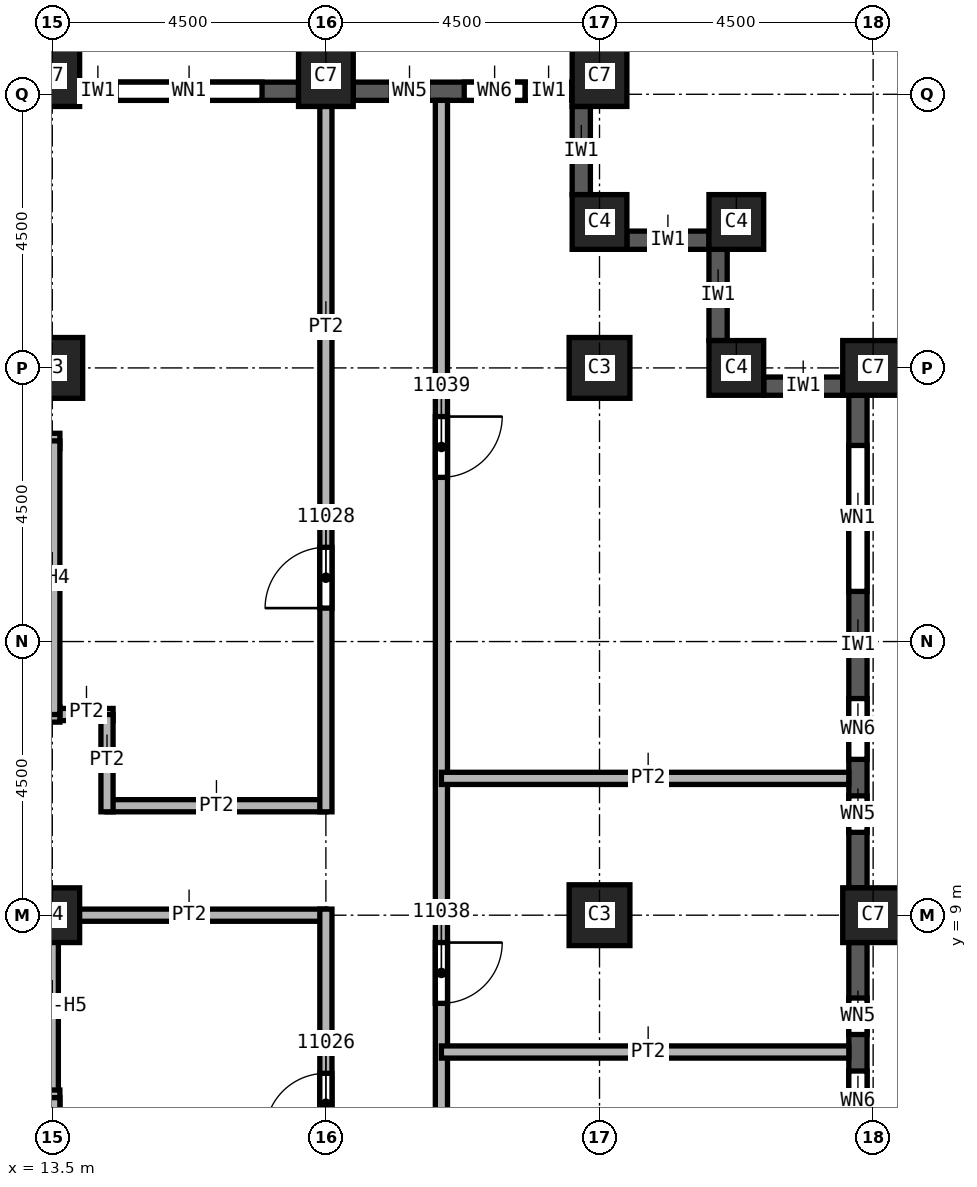
"""IFC4 building model, lengths in metres.
Left out: names, types, materials, properties, quantities, classifications, styles, units other than length and angle.
Written with IfcOpenShell. Run it as: python <this file> out.ifc"""

import sys

from ifc_helpers import new_model, si_unit, direction, frame, frame_2d, origin, origin_2d, place, context, subcontext, project, spatial, rectangle, extrude, element, fill, save


model = new_model("IFC4")
c1 = context("Model", 3, precision=1e-05, world=origin(), true_north=direction((0.0, 1.0)))
c2 = subcontext(c1, "Body", "Model", "MODEL_VIEW")
j1 = project(units=[si_unit("LENGTHUNIT", "METRE"), si_unit("PLANEANGLEUNIT", "RADIAN")], contexts=[c1])
p1 = place(None, origin())
s1 = spatial("IfcSite", under=j1, at=p1, CompositionType="ELEMENT")
p2 = place(p1, origin())
s2 = spatial("IfcBuilding", under=s1, at=p2, CompositionType="ELEMENT")
p3 = place(p2, frame((0.0, 0.0, 188.0)))
s3 = spatial("IfcBuildingStorey", under=s2, at=p3, CompositionType="ELEMENT", Elevation=188.0)
for number, where, z_axis, x_axis in (
    (1, (13.5, 18.0, 0.0), (0.0, 0.0, 1.0), (1.0, 0.0, 0.0)),
    (2, (22.5, 9.0, 0.0), (0.0, 0.0, 1.0), (1.0, 0.0, 0.0)),
    (3, (22.5, 18.0, 0.0), (0.0, 0.0, 1.0), (1.0, 0.0, 0.0)),
):
    element("IfcColumn", number, at=place(p3, frame(where, z_axis=z_axis, x_axis=x_axis)), inside=s3, PredefinedType="COLUMN", context=c2, shape_type="SweptSolid", body=[
        extrude(rectangle(XDim=1.0, YDim=1.0, at=origin_2d()), origin(), (0.0, 0.0, 1.0), 3.72),
    ])
p4 = place(p3, frame((13.5, 9.0, 0.0), z_axis=(0.0, 0.0, 1.0), x_axis=(1.0, 0.0, 0.0)))
e4 = element("IfcColumn", 4, at=p4, inside=s3, PredefinedType="COLUMN", context=c2, shape_type="SweptSolid", body=[
    extrude(rectangle(XDim=0.9, YDim=0.9, at=origin_2d()), origin(), (0.0, 0.0, 1.0), 3.72),
])
for number, where, z_axis, x_axis in (
    (5, (27.0, 9.0, 0.0), (0.0, 0.0, 1.0), (0.0, 1.0, 0.0)),
    (6, (27.0, 18.0, 0.0), (0.0, 0.0, 1.0), (0.0, 1.0, 0.0)),
    (7, (13.5, 22.8, 0.0), (0.0, 0.0, 1.0), (1.0, 0.0, 0.0)),
    (8, (18.0, 22.8, 0.0), (0.0, 0.0, 1.0), (1.0, 0.0, 0.0)),
    (9, (22.5, 22.8, 0.0), (0.0, 0.0, 1.0), (1.0, 0.0, 0.0)),
):
    element("IfcColumn", number, at=place(p3, frame(where, z_axis=z_axis, x_axis=x_axis)), inside=s3, PredefinedType="COLUMN", context=c2, shape_type="SweptSolid", body=[
        extrude(rectangle(XDim=0.9, YDim=1.0, at=origin_2d()), origin(), (0.0, 0.0, 1.0), 3.72),
    ])
for number, where, z_axis, x_axis in (
    (10, (22.5, 20.4, 0.0), (0.0, 0.0, 1.0), (1.0, 0.0, 0.0)),
    (11, (24.75, 20.4, 0.0), (0.0, 0.0, 1.0), (1.0, 0.0, 0.0)),
    (12, (24.75, 18.0, 0.0), (0.0, 0.0, 1.0), (1.0, 0.0, 0.0)),
):
    element("IfcColumn", number, at=place(p3, frame(where, z_axis=z_axis, x_axis=x_axis)), inside=s3, PredefinedType="COLUMN", context=c2, shape_type="SweptSolid", body=[
        extrude(rectangle(XDim=0.9, YDim=0.9, at=origin_2d()), origin(), (0.0, 0.0, 1.0), 3.72),
    ])
p5 = place(p3, frame((26.75, 0.45, 0.0), z_axis=(0.0, 0.0, 1.0), x_axis=(0.0, 1.0, 0.0)))
e13 = element("IfcWall", 13, at=p5, inside=s3, PredefinedType="SOLIDWALL", context=c2, shape_type="SweptSolid", body=[
    extrude(rectangle(XDim=8.1, YDim=0.3, at=frame_2d((4.05, 0.0))), origin(), (0.0, 0.0, 1.0), 3.12),
])
p6 = place(p5, frame((0.825, 0.0, 0.8)))
e14 = element("IfcOpeningElement", 14, at=p6, cuts=e13, PredefinedType="OPENING", context=c2, shape_type="SweptSolid", body=[
    extrude(rectangle(XDim=2.4, YDim=1.95, at=frame_2d((1.2, 0.975))), frame((0.0, 0.15, 0.0), z_axis=(0.0, -1.0, 0.0), x_axis=(1.0, 0.0, 0.0)), (0.0, 0.0, 1.0), 0.3),
])
p7 = place(p5, frame((4.988, 0.0, 0.8)))
e15 = element("IfcOpeningElement", 15, at=p7, cuts=e13, PredefinedType="OPENING", context=c2, shape_type="SweptSolid", body=[
    extrude(rectangle(XDim=1.0, YDim=1.95, at=frame_2d((0.5, 0.975))), frame((0.0, 0.15, 0.0), z_axis=(0.0, -1.0, 0.0), x_axis=(1.0, 0.0, 0.0)), (0.0, 0.0, 1.0), 0.3),
])
p8 = place(p5, frame((6.587, 0.0, 0.8)))
e16 = element("IfcOpeningElement", 16, at=p8, cuts=e13, PredefinedType="OPENING", context=c2, shape_type="SweptSolid", body=[
    extrude(rectangle(XDim=0.6, YDim=1.95, at=frame_2d((0.3, 0.975))), frame((0.0, 0.15, 0.0), z_axis=(0.0, -1.0, 0.0), x_axis=(1.0, 0.0, 0.0)), (0.0, 0.0, 1.0), 0.3),
])
p9 = place(p3, frame((26.75, 9.45, 0.0), z_axis=(0.0, 0.0, 1.0), x_axis=(0.0, 1.0, 0.0)))
e17 = element("IfcWall", 17, at=p9, inside=s3, PredefinedType="SOLIDWALL", context=c2, shape_type="SweptSolid", body=[
    extrude(rectangle(XDim=8.1, YDim=0.3, at=frame_2d((4.05, 0.0))), origin(), (0.0, 0.0, 1.0), 3.12),
])
p10 = place(p9, frame((4.875, 0.0, 0.8)))
e18 = element("IfcOpeningElement", 18, at=p10, cuts=e17, PredefinedType="OPENING", context=c2, shape_type="SweptSolid", body=[
    extrude(rectangle(XDim=2.4, YDim=1.95, at=frame_2d((1.2, 0.975))), frame((0.0, 0.15, 0.0), z_axis=(0.0, -1.0, 0.0), x_axis=(1.0, 0.0, 0.0)), (0.0, 0.0, 1.0), 0.3),
])
p11 = place(p9, frame((0.913, 0.0, 0.8)))
e19 = element("IfcOpeningElement", 19, at=p11, cuts=e17, PredefinedType="OPENING", context=c2, shape_type="SweptSolid", body=[
    extrude(rectangle(XDim=0.6, YDim=1.95, at=frame_2d((0.3, 0.975))), frame((0.0, 0.15, 0.0), z_axis=(0.0, -1.0, 0.0), x_axis=(1.0, 0.0, 0.0)), (0.0, 0.0, 1.0), 0.3),
])
p12 = place(p9, frame((2.113, 0.0, 0.8)))
e20 = element("IfcOpeningElement", 20, at=p12, cuts=e17, PredefinedType="OPENING", context=c2, shape_type="SweptSolid", body=[
    extrude(rectangle(XDim=1.0, YDim=1.95, at=frame_2d((0.5, 0.975))), frame((0.0, 0.15, 0.0), z_axis=(0.0, -1.0, 0.0), x_axis=(1.0, 0.0, 0.0)), (0.0, 0.0, 1.0), 0.3),
])
p13 = place(p3, frame((26.5, 17.7, 0.0), z_axis=(0.0, 0.0, 1.0), x_axis=(-1.0, 0.0, 0.0)))
e21 = element("IfcWall", 21, at=p13, inside=s3, PredefinedType="SOLIDWALL", context=c2, shape_type="SweptSolid", body=[
    extrude(rectangle(XDim=1.3, YDim=0.3, at=frame_2d((0.65, 0.0))), origin(), (0.0, 0.0, 1.0), 3.12),
])
p14 = place(p3, frame((24.45, 18.45, 0.0), z_axis=(0.0, 0.0, 1.0), x_axis=(0.0, 1.0, 0.0)))
e22 = element("IfcWall", 22, at=p14, inside=s3, PredefinedType="SOLIDWALL", context=c2, shape_type="SweptSolid", body=[
    extrude(rectangle(XDim=1.5, YDim=0.3, at=frame_2d((0.75, 0.0))), origin(), (0.0, 0.0, 1.0), 3.12),
])
p15 = place(p3, frame((24.3, 20.1, 0.0), z_axis=(0.0, 0.0, 1.0), x_axis=(-1.0, 0.0, 0.0)))
e23 = element("IfcWall", 23, at=p15, inside=s3, PredefinedType="SOLIDWALL", context=c2, shape_type="SweptSolid", body=[
    extrude(rectangle(XDim=1.35, YDim=0.3, at=frame_2d((0.675, 0.0))), origin(), (0.0, 0.0, 1.0), 3.12),
])
p16 = place(p3, frame((22.2, 20.85, 0.0), z_axis=(0.0, 0.0, 1.0), x_axis=(0.0, 1.0, 0.0)))
e24 = element("IfcWall", 24, at=p16, inside=s3, PredefinedType="SOLIDWALL", context=c2, shape_type="SweptSolid", body=[
    extrude(rectangle(XDim=1.45, YDim=0.3, at=frame_2d((0.725, 0.0))), origin(), (0.0, 0.0, 1.0), 3.12),
])
p17 = place(p3, frame((22.05, 22.55, 0.0), z_axis=(0.0, 0.0, 1.0), x_axis=(-1.0, 0.0, 0.0)))
e25 = element("IfcWall", 25, at=p17, inside=s3, PredefinedType="SOLIDWALL", context=c2, shape_type="SweptSolid", body=[
    extrude(rectangle(XDim=3.6, YDim=0.3, at=frame_2d((1.8, 0.0))), origin(), (0.0, 0.0, 1.0), 3.12),
])
p18 = place(p17, frame((0.775, 0.0, 0.8)))
e26 = element("IfcOpeningElement", 26, at=p18, cuts=e25, PredefinedType="OPENING", context=c2, shape_type="SweptSolid", body=[
    extrude(rectangle(XDim=1.0, YDim=1.95, at=frame_2d((0.5, 0.975))), frame((0.0, 0.15, 0.0), z_axis=(0.0, -1.0, 0.0), x_axis=(1.0, 0.0, 0.0)), (0.0, 0.0, 1.0), 0.3),
])
p19 = place(p17, frame((2.375, 0.0, 0.8)))
e27 = element("IfcOpeningElement", 27, at=p19, cuts=e25, PredefinedType="OPENING", context=c2, shape_type="SweptSolid", body=[
    extrude(rectangle(XDim=0.6, YDim=1.95, at=frame_2d((0.3, 0.975))), frame((0.0, 0.15, 0.0), z_axis=(0.0, -1.0, 0.0), x_axis=(1.0, 0.0, 0.0)), (0.0, 0.0, 1.0), 0.3),
])
p20 = place(p3, frame((17.55, 22.55, 0.0), z_axis=(0.0, 0.0, 1.0), x_axis=(-1.0, 0.0, 0.0)))
e28 = element("IfcWall", 28, at=p20, inside=s3, PredefinedType="SOLIDWALL", context=c2, shape_type="SweptSolid", body=[
    extrude(rectangle(XDim=3.6, YDim=0.3, at=frame_2d((1.8, 0.0))), origin(), (0.0, 0.0, 1.0), 3.12),
])
p21 = place(p20, frame((0.6, 0.0, 0.8)))
e29 = element("IfcOpeningElement", 29, at=p21, cuts=e28, PredefinedType="OPENING", context=c2, shape_type="SweptSolid", body=[
    extrude(rectangle(XDim=2.4, YDim=1.95, at=frame_2d((1.2, 0.975))), frame((0.0, 0.15, 0.0), z_axis=(0.0, -1.0, 0.0), x_axis=(1.0, 0.0, 0.0)), (0.0, 0.0, 1.0), 0.3),
])
p22 = place(p3, frame((13.375, 12.3, 0.0), z_axis=(0.0, 0.0, 1.0), x_axis=(1.0, 0.0, 0.0)))
e30 = element("IfcWall", 30, at=p22, inside=s3, PredefinedType="PARTITIONING", context=c2, shape_type="SweptSolid", body=[
    extrude(rectangle(XDim=1.125, YDim=0.2, at=frame_2d((0.562, 0.0))), origin(), (0.0, 0.0, 1.0), 3.72),
])
p23 = place(p3, frame((18.0, 9.0, 0.0), z_axis=(0.0, 0.0, 1.0), x_axis=(-1.0, 0.0, 0.0)))
e31 = element("IfcWall", 31, at=p23, inside=s3, PredefinedType="PARTITIONING", context=c2, shape_type="SweptSolid", body=[
    extrude(rectangle(XDim=4.5, YDim=0.2, at=frame_2d((2.25, 0.0))), origin(), (0.0, 0.0, 1.0), 3.72),
])
p24 = place(p3, frame((14.4, 10.8, 0.0), z_axis=(0.0, 0.0, 1.0), x_axis=(1.0, 0.0, 0.0)))
e32 = element("IfcWall", 32, at=p24, inside=s3, PredefinedType="PARTITIONING", context=c2, shape_type="SweptSolid", body=[
    extrude(rectangle(XDim=3.6, YDim=0.2, at=frame_2d((1.8, 0.0))), origin(), (0.0, 0.0, 1.0), 3.72),
])
p25 = place(p3, frame((14.4, 12.3, 0.0), z_axis=(0.0, 0.0, 1.0), x_axis=(0.0, -1.0, 0.0)))
e33 = element("IfcWall", 33, at=p25, inside=s3, PredefinedType="PARTITIONING", context=c2, shape_type="SweptSolid", body=[
    extrude(rectangle(XDim=1.6, YDim=0.2, at=frame_2d((0.8, 0.0))), origin(), (0.0, 0.0, 1.0), 3.72),
])
p26 = place(p3, frame((18.0, -9.1, 0.0), z_axis=(0.0, 0.0, 1.0), x_axis=(0.0, 1.0, 0.0)))
e34 = element("IfcWall", 34, at=p26, inside=s3, PredefinedType="PARTITIONING", context=c2, shape_type="SweptSolid", body=[
    extrude(rectangle(XDim=18.2, YDim=0.2, at=frame_2d((9.1, 0.0))), origin(), (0.0, 0.0, 1.0), 3.72),
])
p27 = place(p26, frame((2.8, 0.0, 0.0)))
e35 = element("IfcOpeningElement", 35, at=p27, cuts=e34, PredefinedType="OPENING", context=c2, shape_type="SweptSolid", body=[
    extrude(rectangle(XDim=1.0, YDim=2.1, at=frame_2d((0.5, 1.05))), frame((0.0, 0.1, 0.0), z_axis=(0.0, -1.0, 0.0), x_axis=(1.0, 0.0, 0.0)), (0.0, 0.0, 1.0), 0.2),
])
p28 = place(p26, frame((8.65, 0.0, 0.0)))
e36 = element("IfcOpeningElement", 36, at=p28, cuts=e34, PredefinedType="OPENING", context=c2, shape_type="SweptSolid", body=[
    extrude(rectangle(XDim=1.0, YDim=2.1, at=frame_2d((0.5, 1.05))), frame((0.0, 0.1, 0.0), z_axis=(0.0, -1.0, 0.0), x_axis=(1.0, 0.0, 0.0)), (0.0, 0.0, 1.0), 0.2),
])
p29 = place(p26, frame((14.5, 0.0, 0.0)))
e37 = element("IfcOpeningElement", 37, at=p29, cuts=e34, PredefinedType="OPENING", context=c2, shape_type="SweptSolid", body=[
    extrude(rectangle(XDim=1.0, YDim=2.1, at=frame_2d((0.5, 1.05))), frame((0.0, 0.1, 0.0), z_axis=(0.0, -1.0, 0.0), x_axis=(1.0, 0.0, 0.0)), (0.0, 0.0, 1.0), 0.2),
])
p30 = place(p3, frame((18.0, 10.7, 0.0), z_axis=(0.0, 0.0, 1.0), x_axis=(0.0, 1.0, 0.0)))
e38 = element("IfcWall", 38, at=p30, inside=s3, PredefinedType="PARTITIONING", context=c2, shape_type="SweptSolid", body=[
    extrude(rectangle(XDim=11.6, YDim=0.2, at=frame_2d((5.8, 0.0))), origin(), (0.0, 0.0, 1.0), 3.72),
])
p31 = place(p30, frame((3.35, 0.0, 0.0)))
e39 = element("IfcOpeningElement", 39, at=p31, cuts=e38, PredefinedType="OPENING", context=c2, shape_type="SweptSolid", body=[
    extrude(rectangle(XDim=1.0, YDim=2.1, at=frame_2d((0.5, 1.05))), frame((0.0, 0.1, 0.0), z_axis=(0.0, -1.0, 0.0), x_axis=(1.0, 0.0, 0.0)), (0.0, 0.0, 1.0), 0.2),
])
p32 = place(p3, frame((19.9, 22.4, 0.0), z_axis=(0.0, 0.0, 1.0), x_axis=(0.0, -1.0, 0.0)))
e40 = element("IfcWall", 40, at=p32, inside=s3, PredefinedType="PARTITIONING", context=c2, shape_type="SweptSolid", body=[
    extrude(rectangle(XDim=44.8, YDim=0.2, at=frame_2d((22.4, 0.0))), origin(), (0.0, 0.0, 1.0), 3.72),
])
p33 = place(p32, frame((20.3, 0.0, 0.0)))
e41 = element("IfcOpeningElement", 41, at=p33, cuts=e40, PredefinedType="OPENING", context=c2, shape_type="SweptSolid", body=[
    extrude(rectangle(XDim=1.0, YDim=2.1, at=frame_2d((0.5, 1.05))), frame((0.0, 0.1, 0.0), z_axis=(0.0, -1.0, 0.0), x_axis=(1.0, 0.0, 0.0)), (0.0, 0.0, 1.0), 0.2),
])
p34 = place(p32, frame((13.85, 0.0, 0.0)))
e42 = element("IfcOpeningElement", 42, at=p34, cuts=e40, PredefinedType="OPENING", context=c2, shape_type="SweptSolid", body=[
    extrude(rectangle(XDim=1.0, YDim=2.1, at=frame_2d((0.5, 1.05))), frame((0.0, 0.1, 0.0), z_axis=(0.0, -1.0, 0.0), x_axis=(1.0, 0.0, 0.0)), (0.0, 0.0, 1.0), 0.2),
])
p35 = place(p32, frame((5.2, 0.0, 0.0)))
e43 = element("IfcOpeningElement", 43, at=p35, cuts=e40, PredefinedType="OPENING", context=c2, shape_type="SweptSolid", body=[
    extrude(rectangle(XDim=1.0, YDim=2.1, at=frame_2d((0.5, 1.05))), frame((0.0, 0.1, 0.0), z_axis=(0.0, -1.0, 0.0), x_axis=(1.0, 0.0, 0.0)), (0.0, 0.0, 1.0), 0.2),
])
p36 = place(p32, frame((40.05, 0.0, 0.0)))
e44 = element("IfcOpeningElement", 44, at=p36, cuts=e40, PredefinedType="OPENING", context=c2, shape_type="SweptSolid", body=[
    extrude(rectangle(XDim=1.0, YDim=2.1, at=frame_2d((0.5, 1.05))), frame((0.0, 0.1, 0.0), z_axis=(0.0, -1.0, 0.0), x_axis=(1.0, 0.0, 0.0)), (0.0, 0.0, 1.0), 0.2),
])
p37 = place(p32, frame((26.9, 0.0, 0.0)))
e45 = element("IfcOpeningElement", 45, at=p37, cuts=e40, PredefinedType="OPENING", context=c2, shape_type="SweptSolid", body=[
    extrude(rectangle(XDim=1.0, YDim=2.1, at=frame_2d((0.5, 1.05))), frame((0.0, 0.1, 0.0), z_axis=(0.0, -1.0, 0.0), x_axis=(1.0, 0.0, 0.0)), (0.0, 0.0, 1.0), 0.2),
])
for number, where, z_axis, x_axis in (
    (46, (19.9, 6.75, 0.0), (0.0, 0.0, 1.0), (1.0, 0.0, 0.0)),
    (47, (19.9, 11.25, 0.0), (0.0, 0.0, 1.0), (1.0, 0.0, 0.0)),
):
    element("IfcWall", number, at=place(p3, frame(where, z_axis=z_axis, x_axis=x_axis)), inside=s3, PredefinedType="PARTITIONING", context=c2, shape_type="SweptSolid", body=[
        extrude(rectangle(XDim=6.7, YDim=0.2, at=frame_2d((3.35, 0.0))), origin(), (0.0, 0.0, 1.0), 3.72),
    ])
for number, where, z_axis, x_axis in (
    (48, (10.5, 9.0, 0.0), (0.0, 0.0, 1.0), (1.0, 0.0, 0.0)),
    (49, (13.5, 9.1, 0.0), (0.0, 0.0, 1.0), (0.0, -1.0, 0.0)),
):
    element("IfcWall", number, at=place(p3, frame(where, z_axis=z_axis, x_axis=x_axis)), inside=s3, PredefinedType="SOLIDWALL", context=c2, shape_type="SweptSolid", body=[
        extrude(rectangle(XDim=3.1, YDim=0.2, at=frame_2d((1.55, 0.0))), origin(), (0.0, 0.0, 1.0), 2.958),
    ])
p38 = place(p3, frame((10.5, 6.0, 0.0), z_axis=(0.0, 0.0, 1.0), x_axis=(1.0, 0.0, 0.0)))
e50 = element("IfcWall", 50, at=p38, inside=s3, PredefinedType="SOLIDWALL", context=c2, shape_type="SweptSolid", body=[
    extrude(rectangle(XDim=3.125, YDim=0.25, at=frame_2d((1.562, 0.0))), origin(), (0.0, 0.0, 1.0), 3.72),
])
p39 = place(p3, frame((13.5, 6.0, 0.0), z_axis=(0.0, 0.0, 1.0), x_axis=(0.0, -1.0, 0.0)))
e51 = element("IfcWall", 51, at=p39, inside=s3, PredefinedType="SOLIDWALL", context=c2, shape_type="SweptSolid", body=[
    extrude(rectangle(XDim=9.0, YDim=0.25, at=frame_2d((4.5, 0.0))), origin(), (0.0, 0.0, 1.0), 2.958),
])
p40 = place(p3, frame((4.375, 12.3, 0.0), z_axis=(0.0, 0.0, 1.0), x_axis=(1.0, 0.0, 0.0)))
e52 = element("IfcWall", 52, at=p40, inside=s3, PredefinedType="SOLIDWALL", context=c2, shape_type="SweptSolid", body=[
    extrude(rectangle(XDim=9.25, YDim=0.25, at=frame_2d((4.625, 0.0))), origin(), (0.0, 0.0, 1.0), 3.72),
])
p41 = place(p40, frame((7.2, 0.0, 0.0)))
e53 = element("IfcOpeningElement", 53, at=p41, cuts=e52, PredefinedType="OPENING", context=c2, shape_type="SweptSolid", body=[
    extrude(rectangle(XDim=1.2, YDim=2.1, at=frame_2d((0.6, 1.05))), frame((0.0, 0.125, 0.0), z_axis=(0.0, -1.0, 0.0), x_axis=(1.0, 0.0, 0.0)), (0.0, 0.0, 1.0), 0.25),
])
p42 = place(p3, frame((4.375, 16.8, 0.0), z_axis=(0.0, 0.0, 1.0), x_axis=(1.0, 0.0, 0.0)))
e54 = element("IfcWall", 54, at=p42, inside=s3, PredefinedType="SOLIDWALL", context=c2, shape_type="SweptSolid", body=[
    extrude(rectangle(XDim=9.25, YDim=0.25, at=frame_2d((4.625, 0.0))), origin(), (0.0, 0.0, 1.0), 3.72),
])
p43 = place(p3, frame((13.5, 16.8, 0.0), z_axis=(0.0, 0.0, 1.0), x_axis=(0.0, -1.0, 0.0)))
e55 = element("IfcWall", 55, at=p43, inside=s3, PredefinedType="SOLIDWALL", context=c2, shape_type="SweptSolid", body=[
    extrude(rectangle(XDim=4.5, YDim=0.25, at=frame_2d((2.25, 0.0))), origin(), (0.0, 0.0, 1.0), 3.72),
])
p44 = place(p10, origin())
e56 = element("IfcWindow", 56, at=p44, inside=s3, PartitioningType="SINGLE_PANEL", PredefinedType="WINDOW", context=c2, shape_type="SweptSolid", body=[
    extrude(rectangle(XDim=2.4, YDim=1.95, at=frame_2d((1.2, 0.975))), frame((0.0, 0.03, 0.0), z_axis=(0.0, -1.0, 0.0), x_axis=(1.0, 0.0, 0.0)), (0.0, 0.0, 1.0), 0.06),
])
fill(e18, e56)
p45 = place(p21, origin())
e57 = element("IfcWindow", 57, at=p45, inside=s3, PartitioningType="SINGLE_PANEL", PredefinedType="WINDOW", context=c2, shape_type="SweptSolid", body=[
    extrude(rectangle(XDim=2.4, YDim=1.95, at=frame_2d((1.2, 0.975))), frame((0.0, 0.03, 0.0), z_axis=(0.0, -1.0, 0.0), x_axis=(1.0, 0.0, 0.0)), (0.0, 0.0, 1.0), 0.06),
])
fill(e29, e57)
p46 = place(p29, origin())
e58 = element("IfcDoor", 58, at=p46, inside=s3, OperationType="SINGLE_SWING_LEFT", PredefinedType="DOOR", context=c2, shape_type="SweptSolid", body=[
    extrude(rectangle(XDim=1.0, YDim=2.1, at=frame_2d((0.5, 1.05))), frame((0.0, 0.025, 0.0), z_axis=(0.0, -1.0, 0.0), x_axis=(1.0, 0.0, 0.0)), (0.0, 0.0, 1.0), 0.05),
])
fill(e37, e58)
p47 = place(p31, origin())
e59 = element("IfcDoor", 59, at=p47, inside=s3, OperationType="SINGLE_SWING_LEFT", PredefinedType="DOOR", context=c2, shape_type="SweptSolid", body=[
    extrude(rectangle(XDim=1.0, YDim=2.1, at=frame_2d((0.5, 1.05))), frame((0.0, 0.025, 0.0), z_axis=(0.0, -1.0, 0.0), x_axis=(1.0, 0.0, 0.0)), (0.0, 0.0, 1.0), 0.05),
])
fill(e39, e59)
p48 = place(p34, origin())
e60 = element("IfcDoor", 60, at=p48, inside=s3, OperationType="SINGLE_SWING_LEFT", PredefinedType="DOOR", context=c2, shape_type="SweptSolid", body=[
    extrude(rectangle(XDim=1.0, YDim=2.1, at=frame_2d((0.5, 1.05))), frame((0.0, 0.025, 0.0), z_axis=(0.0, -1.0, 0.0), x_axis=(1.0, 0.0, 0.0)), (0.0, 0.0, 1.0), 0.05),
])
fill(e42, e60)
p49 = place(p35, origin())
e61 = element("IfcDoor", 61, at=p49, inside=s3, OperationType="SINGLE_SWING_RIGHT", PredefinedType="DOOR", context=c2, shape_type="SweptSolid", body=[
    extrude(rectangle(XDim=1.0, YDim=2.1, at=frame_2d((0.5, 1.05))), frame((0.0, 0.025, 0.0), z_axis=(0.0, -1.0, 0.0), x_axis=(1.0, 0.0, 0.0)), (0.0, 0.0, 1.0), 0.05),
])
fill(e43, e61)
p50 = place(p7, origin())
e62 = element("IfcWindow", 62, at=p50, inside=s3, PartitioningType="SINGLE_PANEL", PredefinedType="WINDOW", context=c2, shape_type="SweptSolid", body=[
    extrude(rectangle(XDim=1.0, YDim=1.95, at=frame_2d((0.5, 0.975))), frame((0.0, 0.03, 0.0), z_axis=(0.0, -1.0, 0.0), x_axis=(1.0, 0.0, 0.0)), (0.0, 0.0, 1.0), 0.06),
])
fill(e15, e62)
p51 = place(p8, origin())
e63 = element("IfcWindow", 63, at=p51, inside=s3, PartitioningType="SINGLE_PANEL", PredefinedType="WINDOW", context=c2, shape_type="SweptSolid", body=[
    extrude(rectangle(XDim=0.6, YDim=1.95, at=frame_2d((0.3, 0.975))), frame((0.0, 0.03, 0.0), z_axis=(0.0, -1.0, 0.0), x_axis=(1.0, 0.0, 0.0)), (0.0, 0.0, 1.0), 0.06),
])
fill(e16, e63)
p52 = place(p11, origin())
e64 = element("IfcWindow", 64, at=p52, inside=s3, PartitioningType="SINGLE_PANEL", PredefinedType="WINDOW", context=c2, shape_type="SweptSolid", body=[
    extrude(rectangle(XDim=0.6, YDim=1.95, at=frame_2d((0.3, 0.975))), frame((0.0, 0.03, 0.0), z_axis=(0.0, -1.0, 0.0), x_axis=(1.0, 0.0, 0.0)), (0.0, 0.0, 1.0), 0.06),
])
fill(e19, e64)
p53 = place(p12, origin())
e65 = element("IfcWindow", 65, at=p53, inside=s3, PartitioningType="SINGLE_PANEL", PredefinedType="WINDOW", context=c2, shape_type="SweptSolid", body=[
    extrude(rectangle(XDim=1.0, YDim=1.95, at=frame_2d((0.5, 0.975))), frame((0.0, 0.03, 0.0), z_axis=(0.0, -1.0, 0.0), x_axis=(1.0, 0.0, 0.0)), (0.0, 0.0, 1.0), 0.06),
])
fill(e20, e65)
p54 = place(p18, origin())
e66 = element("IfcWindow", 66, at=p54, inside=s3, PartitioningType="SINGLE_PANEL", PredefinedType="WINDOW", context=c2, shape_type="SweptSolid", body=[
    extrude(rectangle(XDim=1.0, YDim=1.95, at=frame_2d((0.5, 0.975))), frame((0.0, 0.03, 0.0), z_axis=(0.0, -1.0, 0.0), x_axis=(1.0, 0.0, 0.0)), (0.0, 0.0, 1.0), 0.06),
])
fill(e26, e66)
p55 = place(p19, origin())
e67 = element("IfcWindow", 67, at=p55, inside=s3, PartitioningType="SINGLE_PANEL", PredefinedType="WINDOW", context=c2, shape_type="SweptSolid", body=[
    extrude(rectangle(XDim=0.6, YDim=1.95, at=frame_2d((0.3, 0.975))), frame((0.0, 0.03, 0.0), z_axis=(0.0, -1.0, 0.0), x_axis=(1.0, 0.0, 0.0)), (0.0, 0.0, 1.0), 0.06),
])
fill(e27, e67)
save(model, sys.argv[1])
